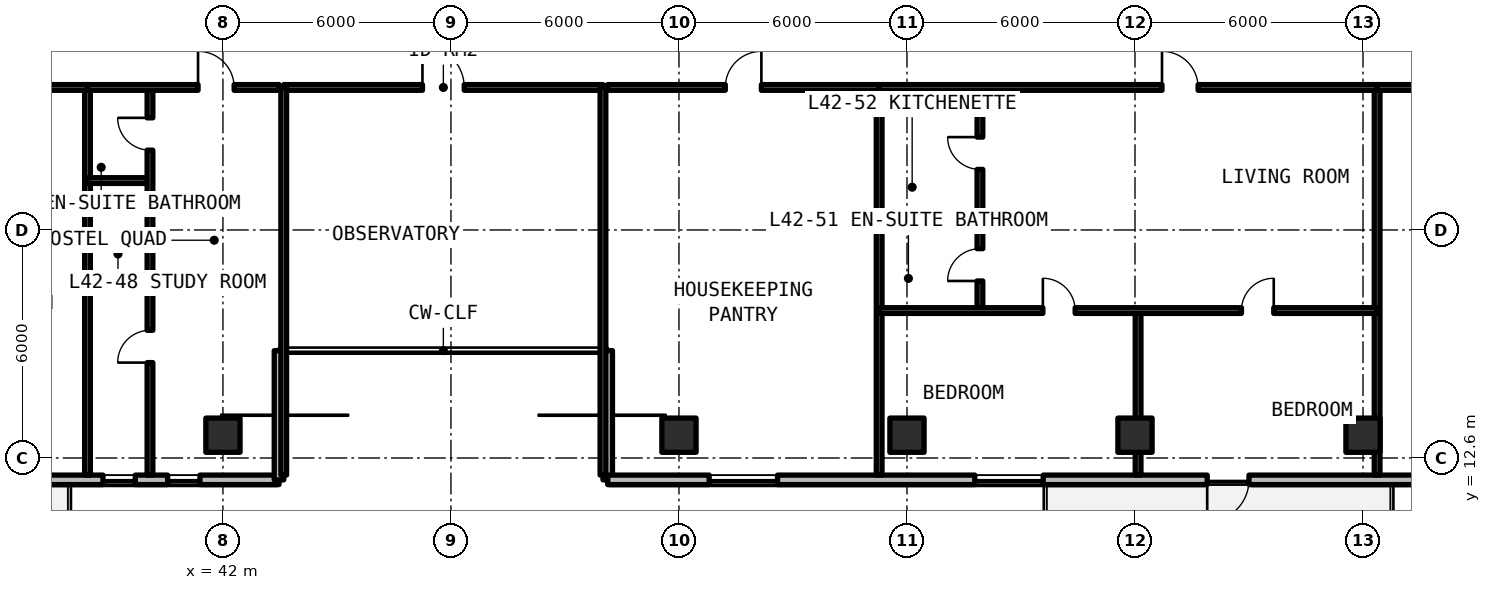
"""IFC4 building model, lengths in metres.
Left out: names, types, materials, properties, quantities, classifications, styles, units other than length and angle.
Written with IfcOpenShell. Run it as: python <this file> out.ifc"""

import sys

from ifc_helpers import new_model, si_unit, direction, frame, frame_2d, origin, origin_2d, place, context, subcontext, project, spatial, rectangle, extrude, element, fill, save


model = new_model("IFC4")
c1 = context("Model", 3, precision=1e-05, world=origin(), true_north=direction((0.0, 1.0)))
c2 = subcontext(c1, "Body", "Model", "MODEL_VIEW")
j1 = project(units=[si_unit("LENGTHUNIT", "METRE"), si_unit("PLANEANGLEUNIT", "RADIAN")], contexts=[c1])
p1 = place(None, origin())
s1 = spatial("IfcSite", under=j1, at=p1, CompositionType="ELEMENT")
p2 = place(p1, origin())
s2 = spatial("IfcBuilding", under=s1, at=p2, CompositionType="ELEMENT")
p3 = place(p2, frame((0.0, 0.0, 151.8)))
s3 = spatial("IfcBuildingStorey", under=s2, at=p3, CompositionType="ELEMENT", Elevation=151.8)
for number, where, z_axis, x_axis in (
    (1, (42.0, 13.2, 0.0), (0.0, 0.0, 1.0), (1.0, 0.0, 0.0)),
    (2, (54.0, 13.2, 0.0), (0.0, 0.0, 1.0), (1.0, 0.0, 0.0)),
    (3, (60.0, 13.2, 0.0), (0.0, 0.0, 1.0), (1.0, 0.0, 0.0)),
    (4, (66.0, 13.2, 0.0), (0.0, 0.0, 1.0), (1.0, 0.0, 0.0)),
    (5, (72.0, 13.2, 0.0), (0.0, 0.0, 1.0), (1.0, 0.0, 0.0)),
):
    element("IfcColumn", number, at=place(p3, frame(where, z_axis=z_axis, x_axis=x_axis)), inside=s3, PredefinedType="COLUMN", context=c2, shape_type="SweptSolid", body=[
        extrude(rectangle(XDim=0.9, YDim=0.9, at=origin_2d()), origin(), (0.0, 0.0, 1.0), 3.3),
    ])
p4 = place(p3, frame((23.852, 12.025, 0.0), z_axis=(0.0, 0.0, 1.0), x_axis=(1.0, 0.0, 0.0)))
e6 = element("IfcWall", 6, at=p4, inside=s3, PredefinedType="SOLIDWALL", context=c2, shape_type="SweptSolid", body=[
    extrude(rectangle(XDim=19.623, YDim=0.25, at=frame_2d((9.812, 0.0))), origin(), (0.0, 0.0, 1.0), 3.08),
])
p5 = place(p4, frame((7.998, 0.0, 0.0)))
e7 = element("IfcOpeningElement", 7, at=p5, cuts=e6, PredefinedType="OPENING", context=c2, shape_type="SweptSolid", body=[
    extrude(rectangle(XDim=1.1, YDim=2.15, at=frame_2d((0.55, 1.075))), frame((0.0, 0.135, 0.0), z_axis=(0.0, -1.0, 0.0), x_axis=(1.0, 0.0, 0.0)), (0.0, 0.0, 1.0), 0.27),
])
p6 = place(p4, frame((1.745, 0.0, 0.78)))
e8 = element("IfcOpeningElement", 8, at=p6, cuts=e6, PredefinedType="OPENING", context=c2, shape_type="SweptSolid", body=[
    extrude(rectangle(XDim=1.8, YDim=1.66, at=frame_2d((0.9, 0.83))), frame((0.0, 0.135, 0.0), z_axis=(0.0, -1.0, 0.0), x_axis=(1.0, 0.0, 0.0)), (0.0, 0.0, 1.0), 0.27),
])
p7 = place(p4, frame((10.444, 0.0, 0.78)))
e9 = element("IfcOpeningElement", 9, at=p7, cuts=e6, PredefinedType="OPENING", context=c2, shape_type="SweptSolid", body=[
    extrude(rectangle(XDim=0.85, YDim=1.65, at=frame_2d((0.425, 0.825))), frame((0.0, 0.135, 0.0), z_axis=(0.0, -1.0, 0.0), x_axis=(1.0, 0.0, 0.0)), (0.0, 0.0, 1.0), 0.27),
])
p8 = place(p4, frame((14.991, 0.0, 0.78)))
e10 = element("IfcOpeningElement", 10, at=p8, cuts=e6, PredefinedType="OPENING", context=c2, shape_type="SweptSolid", body=[
    extrude(rectangle(XDim=0.85, YDim=1.65, at=frame_2d((0.425, 0.825))), frame((0.0, 0.135, 0.0), z_axis=(0.0, -1.0, 0.0), x_axis=(1.0, 0.0, 0.0)), (0.0, 0.0, 1.0), 0.27),
])
p9 = place(p4, frame((16.693, 0.0, 0.78)))
e11 = element("IfcOpeningElement", 11, at=p9, cuts=e6, PredefinedType="OPENING", context=c2, shape_type="SweptSolid", body=[
    extrude(rectangle(XDim=0.85, YDim=1.65, at=frame_2d((0.425, 0.825))), frame((0.0, 0.135, 0.0), z_axis=(0.0, -1.0, 0.0), x_axis=(1.0, 0.0, 0.0)), (0.0, 0.0, 1.0), 0.27),
])
for number, where, z_axis, x_axis in (
    (12, (43.475, 12.025, 0.0), (0.0, 0.0, 1.0), (0.0, 1.0, 0.0)),
    (13, (52.125, 15.425, 0.0), (0.0, 0.0, 1.0), (0.0, -1.0, 0.0)),
):
    element("IfcWall", number, at=place(p3, frame(where, z_axis=z_axis, x_axis=x_axis)), inside=s3, PredefinedType="SOLIDWALL", context=c2, shape_type="SweptSolid", body=[
        extrude(rectangle(XDim=3.4, YDim=0.25, at=frame_2d((1.7, 0.0))), origin(), (0.0, 0.0, 1.0), 3.08),
    ])
p10 = place(p3, frame((52.125, 12.025, 0.0), z_axis=(0.0, 0.0, 1.0), x_axis=(1.0, 0.0, 0.0)))
e14 = element("IfcWall", 14, at=p10, inside=s3, PredefinedType="SOLIDWALL", context=c2, shape_type="SweptSolid", body=[
    extrude(rectangle(XDim=43.623, YDim=0.25, at=frame_2d((21.812, 0.0))), origin(), (0.0, 0.0, 1.0), 3.08),
])
p11 = place(p10, frame((15.775, 0.0, 0.0)))
e15 = element("IfcOpeningElement", 15, at=p11, cuts=e14, PredefinedType="OPENING", context=c2, shape_type="SweptSolid", body=[
    extrude(rectangle(XDim=1.1, YDim=2.15, at=frame_2d((0.55, 1.075))), frame((0.0, 0.135, 0.0), z_axis=(0.0, -1.0, 0.0), x_axis=(1.0, 0.0, 0.0)), (0.0, 0.0, 1.0), 0.27),
])
p12 = place(p10, frame((27.625, 0.0, 0.0)))
e16 = element("IfcOpeningElement", 16, at=p12, cuts=e14, PredefinedType="OPENING", context=c2, shape_type="SweptSolid", body=[
    extrude(rectangle(XDim=1.1, YDim=2.15, at=frame_2d((0.55, 1.075))), frame((0.0, 0.135, 0.0), z_axis=(0.0, -1.0, 0.0), x_axis=(1.0, 0.0, 0.0)), (0.0, 0.0, 1.0), 0.27),
])
p13 = place(p10, frame((2.669, 0.0, 0.78)))
e17 = element("IfcOpeningElement", 17, at=p13, cuts=e14, PredefinedType="OPENING", context=c2, shape_type="SweptSolid", body=[
    extrude(rectangle(XDim=1.8, YDim=1.66, at=frame_2d((0.9, 0.83))), frame((0.0, 0.135, 0.0), z_axis=(0.0, -1.0, 0.0), x_axis=(1.0, 0.0, 0.0)), (0.0, 0.0, 1.0), 0.27),
])
p14 = place(p10, frame((9.659, 0.0, 0.78)))
e18 = element("IfcOpeningElement", 18, at=p14, cuts=e14, PredefinedType="OPENING", context=c2, shape_type="SweptSolid", body=[
    extrude(rectangle(XDim=1.8, YDim=1.66, at=frame_2d((0.9, 0.83))), frame((0.0, 0.135, 0.0), z_axis=(0.0, -1.0, 0.0), x_axis=(1.0, 0.0, 0.0)), (0.0, 0.0, 1.0), 0.27),
])
p15 = place(p10, frame((32.888, 0.0, 0.78)))
e19 = element("IfcOpeningElement", 19, at=p15, cuts=e14, PredefinedType="OPENING", context=c2, shape_type="SweptSolid", body=[
    extrude(rectangle(XDim=1.8, YDim=1.66, at=frame_2d((0.9, 0.83))), frame((0.0, 0.135, 0.0), z_axis=(0.0, -1.0, 0.0), x_axis=(1.0, 0.0, 0.0)), (0.0, 0.0, 1.0), 0.27),
])
p16 = place(p10, frame((39.42, 0.0, 0.78)))
e20 = element("IfcOpeningElement", 20, at=p16, cuts=e14, PredefinedType="OPENING", context=c2, shape_type="SweptSolid", body=[
    extrude(rectangle(XDim=1.8, YDim=1.66, at=frame_2d((0.9, 0.83))), frame((0.0, 0.135, 0.0), z_axis=(0.0, -1.0, 0.0), x_axis=(1.0, 0.0, 0.0)), (0.0, 0.0, 1.0), 0.27),
])
p17 = place(p3, frame((43.6, 22.35, 0.0), z_axis=(0.0, 0.0, 1.0), x_axis=(1.0, 0.0, 0.0)))
e21 = element("IfcWall", 21, at=p17, inside=s3, PredefinedType="SOLIDWALL", context=c2, shape_type="SweptSolid", body=[
    extrude(rectangle(XDim=8.4, YDim=0.15, at=frame_2d((4.2, 0.0))), origin(), (0.0, 0.0, 1.0), 2.35),
])
p18 = place(p17, frame((3.65, 0.0, 0.0)))
e22 = element("IfcOpeningElement", 22, at=p18, cuts=e21, PredefinedType="OPENING", context=c2, shape_type="SweptSolid", body=[
    extrude(rectangle(XDim=1.1, YDim=2.15, at=frame_2d((0.55, 1.075))), frame((0.0, 0.085, 0.0), z_axis=(0.0, -1.0, 0.0), x_axis=(1.0, 0.0, 0.0)), (0.0, 0.0, 1.0), 0.17),
])
for number, where, z_axis, x_axis in (
    (23, (43.6, 12.15, 0.0), (0.0, 0.0, 1.0), (0.0, 1.0, 0.0)),
    (24, (52.0, 12.15, 0.0), (0.0, 0.0, 1.0), (0.0, 1.0, 0.0)),
    (25, (38.436, 12.15, 0.0), (0.0, 0.0, 1.0), (0.0, 1.0, 0.0)),
):
    element("IfcWall", number, at=place(p3, frame(where, z_axis=z_axis, x_axis=x_axis)), inside=s3, PredefinedType="SOLIDWALL", context=c2, shape_type="SweptSolid", body=[
        extrude(rectangle(XDim=10.2, YDim=0.15, at=frame_2d((5.1, 0.0))), origin(), (0.0, 0.0, 1.0), 2.35),
    ])
p19 = place(p3, frame((33.566, 22.35, 0.0), z_axis=(0.0, 0.0, 1.0), x_axis=(1.0, 0.0, 0.0)))
e26 = element("IfcWall", 26, at=p19, inside=s3, PredefinedType="SOLIDWALL", context=c2, shape_type="SweptSolid", body=[
    extrude(rectangle(XDim=4.87, YDim=0.15, at=frame_2d((2.435, 0.0))), origin(), (0.0, 0.0, 1.0), 2.35),
])
p20 = place(p19, frame((1.96, 0.0, 0.0)))
e27 = element("IfcOpeningElement", 27, at=p20, cuts=e26, PredefinedType="OPENING", context=c2, shape_type="SweptSolid", body=[
    extrude(rectangle(XDim=0.95, YDim=2.15, at=frame_2d((0.475, 1.075))), frame((0.0, 0.085, 0.0), z_axis=(0.0, -1.0, 0.0), x_axis=(1.0, 0.0, 0.0)), (0.0, 0.0, 1.0), 0.17),
])
p21 = place(p3, frame((38.436, 19.9, 0.0), z_axis=(0.0, 0.0, 1.0), x_axis=(1.0, 0.0, 0.0)))
e28 = element("IfcWall", 28, at=p21, inside=s3, PredefinedType="PARTITIONING", context=c2, shape_type="SweptSolid", body=[
    extrude(rectangle(XDim=1.644, YDim=0.15, at=frame_2d((0.822, 0.0))), origin(), (0.0, 0.0, 1.0), 2.35),
])
p22 = place(p3, frame((40.08, 12.15, 0.0), z_axis=(0.0, 0.0, 1.0), x_axis=(0.0, 1.0, 0.0)))
e29 = element("IfcWall", 29, at=p22, inside=s3, PredefinedType="PARTITIONING", context=c2, shape_type="SweptSolid", body=[
    extrude(rectangle(XDim=10.2, YDim=0.15, at=frame_2d((5.1, 0.0))), origin(), (0.0, 0.0, 1.0), 2.35),
])
p23 = place(p22, frame((2.96, 0.0, 0.0)))
e30 = element("IfcOpeningElement", 30, at=p23, cuts=e29, PredefinedType="OPENING", context=c2, shape_type="SweptSolid", body=[
    extrude(rectangle(XDim=0.85, YDim=2.1, at=frame_2d((0.425, 1.05))), frame((0.0, 0.085, 0.0), z_axis=(0.0, -1.0, 0.0), x_axis=(1.0, 0.0, 0.0)), (0.0, 0.0, 1.0), 0.17),
])
p24 = place(p22, frame((8.55, 0.0, 0.0)))
e31 = element("IfcOpeningElement", 31, at=p24, cuts=e29, PredefinedType="OPENING", context=c2, shape_type="SweptSolid", body=[
    extrude(rectangle(XDim=0.85, YDim=2.1, at=frame_2d((0.425, 1.05))), frame((0.0, 0.085, 0.0), z_axis=(0.0, -1.0, 0.0), x_axis=(1.0, 0.0, 0.0)), (0.0, 0.0, 1.0), 0.17),
])
p25 = place(p3, frame((38.436, 22.35, 0.0), z_axis=(0.0, 0.0, 1.0), x_axis=(1.0, 0.0, 0.0)))
e32 = element("IfcWall", 32, at=p25, inside=s3, PredefinedType="SOLIDWALL", context=c2, shape_type="SweptSolid", body=[
    extrude(rectangle(XDim=5.044, YDim=0.15, at=frame_2d((2.522, 0.0))), origin(), (0.0, 0.0, 1.0), 2.35),
])
p26 = place(p25, frame((2.909, 0.0, 0.0)))
e33 = element("IfcOpeningElement", 33, at=p26, cuts=e32, PredefinedType="OPENING", context=c2, shape_type="SweptSolid", body=[
    extrude(rectangle(XDim=0.95, YDim=2.15, at=frame_2d((0.475, 1.075))), frame((0.0, 0.085, 0.0), z_axis=(0.0, -1.0, 0.0), x_axis=(1.0, 0.0, 0.0)), (0.0, 0.0, 1.0), 0.17),
])
p27 = place(p3, frame((59.267, 12.15, 0.0), z_axis=(0.0, 0.0, 1.0), x_axis=(0.0, 1.0, 0.0)))
e34 = element("IfcWall", 34, at=p27, inside=s3, PredefinedType="SOLIDWALL", context=c2, shape_type="SweptSolid", body=[
    extrude(rectangle(XDim=10.2, YDim=0.15, at=frame_2d((5.1, 0.0))), origin(), (0.0, 0.0, 1.0), 2.35),
])
p28 = place(p3, frame((52.12, 22.35, 0.0), z_axis=(0.0, 0.0, 1.0), x_axis=(1.0, 0.0, 0.0)))
e35 = element("IfcWall", 35, at=p28, inside=s3, PredefinedType="SOLIDWALL", context=c2, shape_type="SweptSolid", body=[
    extrude(rectangle(XDim=7.147, YDim=0.15, at=frame_2d((3.574, 0.0))), origin(), (0.0, 0.0, 1.0), 2.35),
])
p29 = place(p28, frame((3.099, 0.0, 0.0)))
e36 = element("IfcOpeningElement", 36, at=p29, cuts=e35, PredefinedType="OPENING", context=c2, shape_type="SweptSolid", body=[
    extrude(rectangle(XDim=0.95, YDim=2.15, at=frame_2d((0.475, 1.075))), frame((0.0, 0.085, 0.0), z_axis=(0.0, -1.0, 0.0), x_axis=(1.0, 0.0, 0.0)), (0.0, 0.0, 1.0), 0.17),
])
p30 = place(p3, frame((72.371, 12.15, 0.0), z_axis=(0.0, 0.0, 1.0), x_axis=(0.0, 1.0, 0.0)))
e37 = element("IfcWall", 37, at=p30, inside=s3, PredefinedType="SOLIDWALL", context=c2, shape_type="SweptSolid", body=[
    extrude(rectangle(XDim=10.2, YDim=0.15, at=frame_2d((5.1, 0.0))), origin(), (0.0, 0.0, 1.0), 2.35),
])
p31 = place(p3, frame((59.267, 18.886, 0.0), z_axis=(0.0, 0.0, 1.0), x_axis=(1.0, 0.0, 0.0)))
e38 = element("IfcWall", 38, at=p31, inside=s3, PredefinedType="PARTITIONING", context=c2, shape_type="SweptSolid", body=[
    extrude(rectangle(XDim=2.653, YDim=0.15, at=frame_2d((1.326, 0.0))), origin(), (0.0, 0.0, 1.0), 2.35),
])
p32 = place(p3, frame((61.92, 16.479, 0.0), z_axis=(0.0, 0.0, 1.0), x_axis=(0.0, 1.0, 0.0)))
e39 = element("IfcWall", 39, at=p32, inside=s3, PredefinedType="PARTITIONING", context=c2, shape_type="SweptSolid", body=[
    extrude(rectangle(XDim=5.871, YDim=0.15, at=frame_2d((2.935, 0.0))), origin(), (0.0, 0.0, 1.0), 2.35),
])
p33 = place(p32, frame((0.779, 0.0, 0.0)))
e40 = element("IfcOpeningElement", 40, at=p33, cuts=e39, PredefinedType="OPENING", context=c2, shape_type="SweptSolid", body=[
    extrude(rectangle(XDim=0.85, YDim=2.1, at=frame_2d((0.425, 1.05))), frame((0.0, 0.085, 0.0), z_axis=(0.0, -1.0, 0.0), x_axis=(1.0, 0.0, 0.0)), (0.0, 0.0, 1.0), 0.17),
])
p34 = place(p32, frame((3.714, 0.0, 0.0)))
e41 = element("IfcOpeningElement", 41, at=p34, cuts=e39, PredefinedType="OPENING", context=c2, shape_type="SweptSolid", body=[
    extrude(rectangle(XDim=0.85, YDim=2.1, at=frame_2d((0.425, 1.05))), frame((0.0, 0.085, 0.0), z_axis=(0.0, -1.0, 0.0), x_axis=(1.0, 0.0, 0.0)), (0.0, 0.0, 1.0), 0.17),
])
p35 = place(p3, frame((66.081, 12.15, 0.0), z_axis=(0.0, 0.0, 1.0), x_axis=(0.0, 1.0, 0.0)))
e42 = element("IfcWall", 42, at=p35, inside=s3, PredefinedType="PARTITIONING", context=c2, shape_type="SweptSolid", body=[
    extrude(rectangle(XDim=4.33, YDim=0.15, at=frame_2d((2.165, 0.0))), origin(), (0.0, 0.0, 1.0), 2.35),
])
p36 = place(p3, frame((59.267, 16.479, 0.0), z_axis=(0.0, 0.0, 1.0), x_axis=(1.0, 0.0, 0.0)))
e43 = element("IfcWall", 43, at=p36, inside=s3, PredefinedType="PARTITIONING", context=c2, shape_type="SweptSolid", body=[
    extrude(rectangle(XDim=13.104, YDim=0.15, at=frame_2d((6.552, 0.0))), origin(), (0.0, 0.0, 1.0), 2.35),
])
p37 = place(p36, frame((4.308, 0.0, 0.0)))
e44 = element("IfcOpeningElement", 44, at=p37, cuts=e43, PredefinedType="OPENING", context=c2, shape_type="SweptSolid", body=[
    extrude(rectangle(XDim=0.85, YDim=2.1, at=frame_2d((0.425, 1.05))), frame((0.0, 0.085, 0.0), z_axis=(0.0, -1.0, 0.0), x_axis=(1.0, 0.0, 0.0)), (0.0, 0.0, 1.0), 0.17),
])
p38 = place(p36, frame((9.534, 0.0, 0.0)))
e45 = element("IfcOpeningElement", 45, at=p38, cuts=e43, PredefinedType="OPENING", context=c2, shape_type="SweptSolid", body=[
    extrude(rectangle(XDim=0.85, YDim=2.1, at=frame_2d((0.425, 1.05))), frame((0.0, 0.085, 0.0), z_axis=(0.0, -1.0, 0.0), x_axis=(1.0, 0.0, 0.0)), (0.0, 0.0, 1.0), 0.17),
])
p39 = place(p3, frame((59.267, 22.35, 0.0), z_axis=(0.0, 0.0, 1.0), x_axis=(1.0, 0.0, 0.0)))
e46 = element("IfcWall", 46, at=p39, inside=s3, PredefinedType="SOLIDWALL", context=c2, shape_type="SweptSolid", body=[
    extrude(rectangle(XDim=13.104, YDim=0.15, at=frame_2d((6.552, 0.0))), origin(), (0.0, 0.0, 1.0), 2.35),
])
p40 = place(p39, frame((7.443, 0.0, 0.0)))
e47 = element("IfcOpeningElement", 47, at=p40, cuts=e46, PredefinedType="OPENING", context=c2, shape_type="SweptSolid", body=[
    extrude(rectangle(XDim=0.95, YDim=2.15, at=frame_2d((0.475, 1.075))), frame((0.0, 0.085, 0.0), z_axis=(0.0, -1.0, 0.0), x_axis=(1.0, 0.0, 0.0)), (0.0, 0.0, 1.0), 0.17),
])
p41 = place(p3, frame((72.371, 22.35, 0.0), z_axis=(0.0, 0.0, 1.0), x_axis=(1.0, 0.0, 0.0)))
e48 = element("IfcWall", 48, at=p41, inside=s3, PredefinedType="SOLIDWALL", context=c2, shape_type="SweptSolid", body=[
    extrude(rectangle(XDim=10.125, YDim=0.15, at=frame_2d((5.063, 0.0))), origin(), (0.0, 0.0, 1.0), 2.35),
])
p42 = place(p41, frame((4.513, 0.0, 0.0)))
e49 = element("IfcOpeningElement", 49, at=p42, cuts=e48, PredefinedType="OPENING", context=c2, shape_type="SweptSolid", body=[
    extrude(rectangle(XDim=1.1, YDim=2.15, at=frame_2d((0.55, 1.075))), frame((0.0, 0.085, 0.0), z_axis=(0.0, -1.0, 0.0), x_axis=(1.0, 0.0, 0.0)), (0.0, 0.0, 1.0), 0.17),
])
p43 = place(p8, origin())
e50 = element("IfcWindow", 50, at=p43, inside=s3, PartitioningType="SINGLE_PANEL", PredefinedType="WINDOW", context=c2, shape_type="SweptSolid", body=[
    extrude(rectangle(XDim=0.85, YDim=1.65, at=frame_2d((0.425, 0.825))), frame((0.0, 0.03, 0.0), z_axis=(0.0, -1.0, 0.0), x_axis=(1.0, 0.0, 0.0)), (0.0, 0.0, 1.0), 0.06),
])
fill(e10, e50)
p44 = place(p9, origin())
e51 = element("IfcWindow", 51, at=p44, inside=s3, PartitioningType="SINGLE_PANEL", PredefinedType="WINDOW", context=c2, shape_type="SweptSolid", body=[
    extrude(rectangle(XDim=0.85, YDim=1.65, at=frame_2d((0.425, 0.825))), frame((0.0, 0.03, 0.0), z_axis=(0.0, -1.0, 0.0), x_axis=(1.0, 0.0, 0.0)), (0.0, 0.0, 1.0), 0.06),
])
fill(e11, e51)
p45 = place(p11, frame((1.1, 0.0, 0.0), z_axis=(0.0, 0.0, 1.0), x_axis=(-1.0, 0.0, 0.0)))
e52 = element("IfcDoor", 52, at=p45, inside=s3, OperationType="SINGLE_SWING_LEFT", PredefinedType="DOOR", context=c2, shape_type="SweptSolid", body=[
    extrude(rectangle(XDim=1.1, YDim=2.15, at=frame_2d((0.55, 1.075))), frame((0.0, 0.025, 0.0), z_axis=(0.0, -1.0, 0.0), x_axis=(1.0, 0.0, 0.0)), (0.0, 0.0, 1.0), 0.05),
])
fill(e15, e52)
p46 = place(p13, origin())
e53 = element("IfcWindow", 53, at=p46, inside=s3, PartitioningType="SINGLE_PANEL", PredefinedType="WINDOW", context=c2, shape_type="SweptSolid", body=[
    extrude(rectangle(XDim=1.8, YDim=1.66, at=frame_2d((0.9, 0.83))), frame((0.0, 0.03, 0.0), z_axis=(0.0, -1.0, 0.0), x_axis=(1.0, 0.0, 0.0)), (0.0, 0.0, 1.0), 0.06),
])
fill(e17, e53)
p47 = place(p14, origin())
e54 = element("IfcWindow", 54, at=p47, inside=s3, PartitioningType="SINGLE_PANEL", PredefinedType="WINDOW", context=c2, shape_type="SweptSolid", body=[
    extrude(rectangle(XDim=1.8, YDim=1.66, at=frame_2d((0.9, 0.83))), frame((0.0, 0.03, 0.0), z_axis=(0.0, -1.0, 0.0), x_axis=(1.0, 0.0, 0.0)), (0.0, 0.0, 1.0), 0.06),
])
fill(e18, e54)
p48 = place(p18, origin())
e55 = element("IfcDoor", 55, at=p48, inside=s3, OperationType="SINGLE_SWING_LEFT", PredefinedType="DOOR", context=c2, shape_type="SweptSolid", body=[
    extrude(rectangle(XDim=1.1, YDim=2.15, at=frame_2d((0.55, 1.075))), frame((0.0, 0.025, 0.0), z_axis=(0.0, -1.0, 0.0), x_axis=(1.0, 0.0, 0.0)), (0.0, 0.0, 1.0), 0.05),
])
fill(e22, e55)
p49 = place(p23, origin())
e56 = element("IfcDoor", 56, at=p49, inside=s3, OperationType="SINGLE_SWING_LEFT", PredefinedType="DOOR", context=c2, shape_type="SweptSolid", body=[
    extrude(rectangle(XDim=0.85, YDim=2.1, at=frame_2d((0.425, 1.05))), frame((0.0, 0.025, 0.0), z_axis=(0.0, -1.0, 0.0), x_axis=(1.0, 0.0, 0.0)), (0.0, 0.0, 1.0), 0.05),
])
fill(e30, e56)
p50 = place(p24, origin())
e57 = element("IfcDoor", 57, at=p50, inside=s3, OperationType="SINGLE_SWING_RIGHT", PredefinedType="DOOR", context=c2, shape_type="SweptSolid", body=[
    extrude(rectangle(XDim=0.85, YDim=2.1, at=frame_2d((0.425, 1.05))), frame((0.0, 0.025, 0.0), z_axis=(0.0, -1.0, 0.0), x_axis=(1.0, 0.0, 0.0)), (0.0, 0.0, 1.0), 0.05),
])
fill(e31, e57)
p51 = place(p26, origin())
e58 = element("IfcDoor", 58, at=p51, inside=s3, OperationType="SINGLE_SWING_LEFT", PredefinedType="DOOR", context=c2, shape_type="SweptSolid", body=[
    extrude(rectangle(XDim=0.95, YDim=2.15, at=frame_2d((0.475, 1.075))), frame((0.0, 0.025, 0.0), z_axis=(0.0, -1.0, 0.0), x_axis=(1.0, 0.0, 0.0)), (0.0, 0.0, 1.0), 0.05),
])
fill(e33, e58)
p52 = place(p29, origin())
e59 = element("IfcDoor", 59, at=p52, inside=s3, OperationType="SINGLE_SWING_RIGHT", PredefinedType="DOOR", context=c2, shape_type="SweptSolid", body=[
    extrude(rectangle(XDim=0.95, YDim=2.15, at=frame_2d((0.475, 1.075))), frame((0.0, 0.025, 0.0), z_axis=(0.0, -1.0, 0.0), x_axis=(1.0, 0.0, 0.0)), (0.0, 0.0, 1.0), 0.05),
])
fill(e36, e59)
p53 = place(p33, origin())
e60 = element("IfcDoor", 60, at=p53, inside=s3, OperationType="SINGLE_SWING_LEFT", PredefinedType="DOOR", context=c2, shape_type="SweptSolid", body=[
    extrude(rectangle(XDim=0.85, YDim=2.1, at=frame_2d((0.425, 1.05))), frame((0.0, 0.025, 0.0), z_axis=(0.0, -1.0, 0.0), x_axis=(1.0, 0.0, 0.0)), (0.0, 0.0, 1.0), 0.05),
])
fill(e40, e60)
p54 = place(p34, origin())
e61 = element("IfcDoor", 61, at=p54, inside=s3, OperationType="SINGLE_SWING_RIGHT", PredefinedType="DOOR", context=c2, shape_type="SweptSolid", body=[
    extrude(rectangle(XDim=0.85, YDim=2.1, at=frame_2d((0.425, 1.05))), frame((0.0, 0.025, 0.0), z_axis=(0.0, -1.0, 0.0), x_axis=(1.0, 0.0, 0.0)), (0.0, 0.0, 1.0), 0.05),
])
fill(e41, e61)
p55 = place(p37, origin())
e62 = element("IfcDoor", 62, at=p55, inside=s3, OperationType="SINGLE_SWING_LEFT", PredefinedType="DOOR", context=c2, shape_type="SweptSolid", body=[
    extrude(rectangle(XDim=0.85, YDim=2.1, at=frame_2d((0.425, 1.05))), frame((0.0, 0.025, 0.0), z_axis=(0.0, -1.0, 0.0), x_axis=(1.0, 0.0, 0.0)), (0.0, 0.0, 1.0), 0.05),
])
fill(e44, e62)
p56 = place(p38, origin())
e63 = element("IfcDoor", 63, at=p56, inside=s3, OperationType="SINGLE_SWING_RIGHT", PredefinedType="DOOR", context=c2, shape_type="SweptSolid", body=[
    extrude(rectangle(XDim=0.85, YDim=2.1, at=frame_2d((0.425, 1.05))), frame((0.0, 0.025, 0.0), z_axis=(0.0, -1.0, 0.0), x_axis=(1.0, 0.0, 0.0)), (0.0, 0.0, 1.0), 0.05),
])
fill(e45, e63)
p57 = place(p40, origin())
e64 = element("IfcDoor", 64, at=p57, inside=s3, OperationType="SINGLE_SWING_LEFT", PredefinedType="DOOR", context=c2, shape_type="SweptSolid", body=[
    extrude(rectangle(XDim=0.95, YDim=2.15, at=frame_2d((0.475, 1.075))), frame((0.0, 0.025, 0.0), z_axis=(0.0, -1.0, 0.0), x_axis=(1.0, 0.0, 0.0)), (0.0, 0.0, 1.0), 0.05),
])
fill(e47, e64)
save(model, sys.argv[1])
